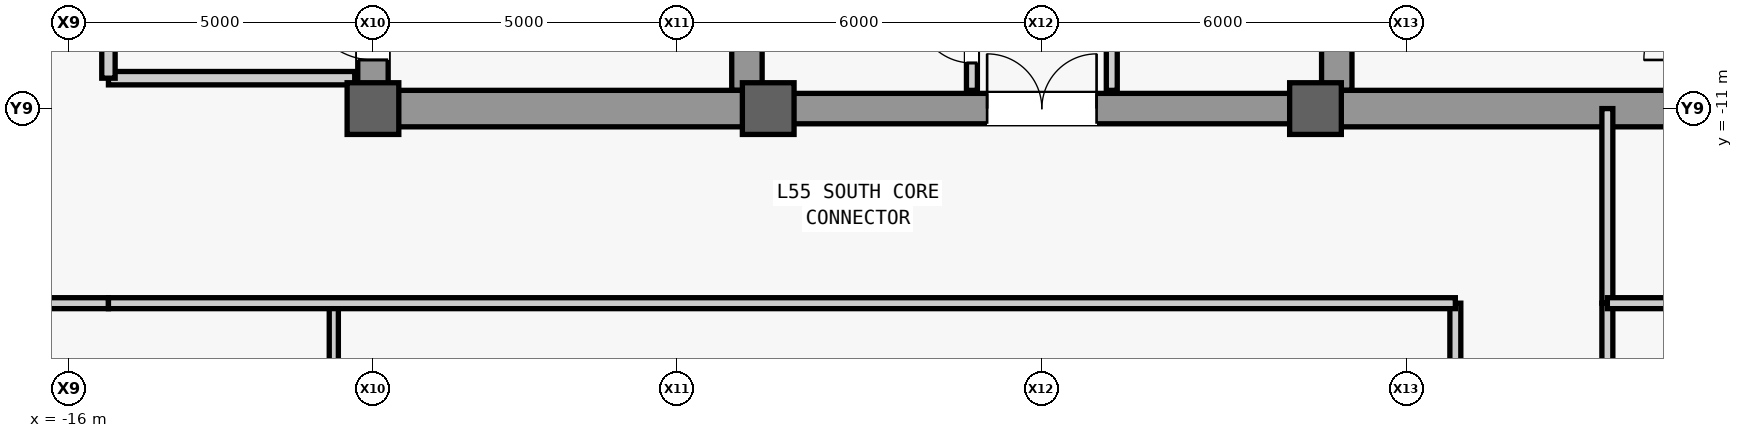
"""IFC4 building model, lengths in metres.
Left out: names, types, materials, properties, quantities, classifications, styles, units other than length and angle.
Written with IfcOpenShell. Run it as: python <this file> out.ifc"""

import sys

from ifc_helpers import new_model, si_unit, direction, frame, frame_2d, origin, origin_2d, place, context, subcontext, project, spatial, rectangle, extrude, source, transform, mapped, element, fill, save


model = new_model("IFC4")
c1 = context("Model", 3, precision=1e-05, world=origin(), true_north=direction((0.0, 1.0)))
c2 = subcontext(c1, "Body", "Model", "MODEL_VIEW")
j1 = project(units=[si_unit("LENGTHUNIT", "METRE"), si_unit("PLANEANGLEUNIT", "RADIAN")], contexts=[c1])
p1 = place(None, origin())
s1 = spatial("IfcSite", under=j1, at=p1, CompositionType="ELEMENT")
p2 = place(p1, origin())
s2 = spatial("IfcBuilding", under=s1, at=p2, CompositionType="ELEMENT")
p3 = place(p2, frame((0.0, 0.0, 235.1)))
s3 = spatial("IfcBuildingStorey", under=s2, at=p3, CompositionType="ELEMENT", Elevation=235.1)
m1 = source(origin(), c2, "Body", "SweptSolid", [
    extrude(rectangle(XDim=22.0, YDim=0.5, at=frame_2d((11.0, 0.0))), origin(), (0.0, 0.0, 1.0), 3.78),
])
p4 = place(p3, frame((-11.0, -11.0, 0.0), z_axis=(0.0, 0.0, 1.0), x_axis=(0.0, 1.0, 0.0)))
e1 = element("IfcWall", 1, at=p4, inside=s3, PredefinedType="SHEAR", context=c2, shape_type="MappedRepresentation", body=[
    mapped(m1, transform((0.0, 0.0, 0.0), scale=1.0)),
])
m2 = source(origin(), c2, "Body", "SweptSolid", [
    extrude(rectangle(XDim=1.1, YDim=2.2, at=frame_2d((0.55, 1.1))), frame((0.0, 0.26, 0.0), z_axis=(0.0, -1.0, 0.0), x_axis=(1.0, 0.0, 0.0)), (0.0, 0.0, 1.0), 0.52),
])
p5 = place(p4, frame((0.8, 0.0, 0.0)))
e2 = element("IfcOpeningElement", 2, at=p5, cuts=e1, PredefinedType="OPENING", context=c2, shape_type="MappedRepresentation", body=[
    mapped(m2, transform((0.0, 0.0, 0.0), scale=1.0)),
])
p6 = place(p4, frame((12.5, 0.0, 0.0)))
e3 = element("IfcOpeningElement", 3, at=p6, cuts=e1, PredefinedType="OPENING", context=c2, shape_type="MappedRepresentation", body=[
    mapped(m2, transform((0.0, 0.0, 0.0), scale=1.0)),
])
m3 = source(origin(), c2, "Body", "SweptSolid", [
    extrude(rectangle(XDim=0.9, YDim=2.15, at=frame_2d((0.45, 1.075))), frame((0.0, 0.26, 0.0), z_axis=(0.0, -1.0, 0.0), x_axis=(1.0, 0.0, 0.0)), (0.0, 0.0, 1.0), 0.52),
])
p7 = place(p4, frame((6.2, 0.0, 0.0)))
e4 = element("IfcOpeningElement", 4, at=p7, cuts=e1, PredefinedType="OPENING", context=c2, shape_type="MappedRepresentation", body=[
    mapped(m3, transform((0.0, 0.0, 0.0), scale=1.0)),
])
p8 = place(p4, frame((8.525, 0.0, 0.0)))
e5 = element("IfcOpeningElement", 5, at=p8, cuts=e1, PredefinedType="OPENING", context=c2, shape_type="MappedRepresentation", body=[
    mapped(m3, transform((0.0, 0.0, 0.0), scale=1.0)),
])
m4 = source(origin(), c2, "Body", "SweptSolid", [
    extrude(rectangle(XDim=1.3, YDim=2.3, at=frame_2d((0.65, 1.15))), frame((0.0, 0.26, 0.0), z_axis=(0.0, -1.0, 0.0), x_axis=(1.0, 0.0, 0.0)), (0.0, 0.0, 1.0), 0.52),
])
p9 = place(p4, frame((2.7, 0.0, 0.0)))
e6 = element("IfcOpeningElement", 6, at=p9, cuts=e1, PredefinedType="OPENING", context=c2, shape_type="MappedRepresentation", body=[
    mapped(m4, transform((0.0, 0.0, 0.0), scale=1.0)),
])
m5 = source(origin(), c2, "Body", "SweptSolid", [
    extrude(rectangle(XDim=21.4, YDim=0.5, at=frame_2d((10.7, 0.0))), origin(), (0.0, 0.0, 1.0), 3.78),
])
for number, where, z_axis, x_axis in (
    (7, (-4.85, -10.7, 0.0), (0.0, 0.0, 1.0), (0.0, 1.0, 0.0)),
    (8, (4.85, -10.7, 0.0), (0.0, 0.0, 1.0), (0.0, 1.0, 0.0)),
):
    element("IfcWall", number, at=place(p3, frame(where, z_axis=z_axis, x_axis=x_axis)), inside=s3, PredefinedType="SHEAR", context=c2, shape_type="MappedRepresentation", body=[
        mapped(m5, transform((0.0, 0.0, 0.0), scale=1.0)),
    ])
m6 = source(origin(), c2, "Body", "SweptSolid", [
    extrude(rectangle(XDim=5.9, YDim=0.6, at=frame_2d((2.95, 0.0))), origin(), (0.0, 0.0, 1.0), 3.78),
])
for number, where, z_axis, x_axis in (
    (9, (-10.75, -11.0, 0.0), (0.0, 0.0, 1.0), (1.0, 0.0, 0.0)),
    (10, (4.85, -11.0, 0.0), (0.0, 0.0, 1.0), (1.0, 0.0, 0.0)),
):
    element("IfcWall", number, at=place(p3, frame(where, z_axis=z_axis, x_axis=x_axis)), inside=s3, PredefinedType="SHEAR", context=c2, shape_type="MappedRepresentation", body=[
        mapped(m6, transform((0.0, 0.0, 0.0), scale=1.0)),
    ])
m7 = source(origin(), c2, "Body", "SweptSolid", [
    extrude(rectangle(XDim=9.2, YDim=0.5, at=frame_2d((4.6, 0.0))), origin(), (0.0, 0.0, 1.0), 3.78),
])
p10 = place(p3, frame((-4.6, -11.0, 0.0), z_axis=(0.0, 0.0, 1.0), x_axis=(1.0, 0.0, 0.0)))
e11 = element("IfcWall", 11, at=p10, inside=s3, PredefinedType="SHEAR", context=c2, shape_type="MappedRepresentation", body=[
    mapped(m7, transform((0.0, 0.0, 0.0), scale=1.0)),
])
m8 = source(origin(), c2, "Body", "SweptSolid", [
    extrude(rectangle(XDim=1.8, YDim=2.25, at=frame_2d((0.9, 1.125))), frame((0.0, 0.26, 0.0), z_axis=(0.0, -1.0, 0.0), x_axis=(1.0, 0.0, 0.0)), (0.0, 0.0, 1.0), 0.52),
])
p11 = place(p10, frame((3.7, 0.0, 0.0)))
e12 = element("IfcOpeningElement", 12, at=p11, cuts=e11, PredefinedType="OPENING", context=c2, shape_type="MappedRepresentation", body=[
    mapped(m8, transform((0.0, 0.0, 0.0), scale=1.0)),
])
m9 = source(origin(), c2, "Body", "SweptSolid", [
    extrude(rectangle(XDim=0.85, YDim=0.85, at=origin_2d()), origin(), (0.0, 0.0, 1.0), 4.0),
])
for number, where, z_axis, x_axis in (
    (13, (-11.0, -11.0, 0.0), (0.0, 0.0, 1.0), (1.0, 0.0, 0.0)),
    (14, (-4.5, -11.0, 0.0), (0.0, 0.0, 1.0), (1.0, 0.0, 0.0)),
    (15, (4.5, -11.0, 0.0), (0.0, 0.0, 1.0), (1.0, 0.0, 0.0)),
):
    element("IfcColumn", number, at=place(p3, frame(where, z_axis=z_axis, x_axis=x_axis)), inside=s3, PredefinedType="COLUMN", context=c2, shape_type="MappedRepresentation", body=[
        mapped(m9, transform((0.0, 0.0, 0.0), scale=1.0)),
    ])
m10 = source(origin(), c2, "Body", "SweptSolid", [
    extrude(rectangle(XDim=4.05, YDim=0.22, at=frame_2d((2.025, 0.0))), origin(), (0.0, 0.0, 1.0), 3.78),
])
p12 = place(p3, frame((-15.35, -10.5, 0.0), z_axis=(0.0, 0.0, 1.0), x_axis=(1.0, 0.0, 0.0)))
e16 = element("IfcWall", 16, at=p12, inside=s3, PredefinedType="PARTITIONING", context=c2, shape_type="MappedRepresentation", body=[
    mapped(m10, transform((0.0, 0.0, 0.0), scale=1.0)),
])
m11 = source(origin(), c2, "Body", "SweptSolid", [
    extrude(rectangle(XDim=4.4, YDim=0.22, at=frame_2d((2.2, 0.0))), origin(), (0.0, 0.0, 1.0), 3.78),
])
p13 = place(p3, frame((-15.35, -10.5, 0.0), z_axis=(0.0, 0.0, 1.0), x_axis=(0.0, 1.0, 0.0)))
e17 = element("IfcWall", 17, at=p13, inside=s3, PredefinedType="PARTITIONING", context=c2, shape_type="MappedRepresentation", body=[
    mapped(m11, transform((0.0, 0.0, 0.0), scale=1.0)),
])
m12 = source(origin(), c2, "Body", "SweptSolid", [
    extrude(rectangle(XDim=1.2, YDim=2.2, at=frame_2d((0.6, 1.1))), frame((0.0, 0.12, 0.0), z_axis=(0.0, -1.0, 0.0), x_axis=(1.0, 0.0, 0.0)), (0.0, 0.0, 1.0), 0.24),
])
p14 = place(p13, frame((1.6, 0.0, 0.0)))
e18 = element("IfcOpeningElement", 18, at=p14, cuts=e17, PredefinedType="OPENING", context=c2, shape_type="MappedRepresentation", body=[
    mapped(m12, transform((0.0, 0.0, 0.0), scale=1.0)),
])
m13 = source(origin(), c2, "Body", "SweptSolid", [
    extrude(rectangle(XDim=5.4, YDim=0.18, at=frame_2d((2.7, 0.0))), origin(), (0.0, 0.0, 1.0), 3.78),
])
p15 = place(p3, frame((-1.15, -10.7, 0.0), z_axis=(0.0, 0.0, 1.0), x_axis=(0.0, 1.0, 0.0)))
e19 = element("IfcWall", 19, at=p15, inside=s3, PredefinedType="PARTITIONING", context=c2, shape_type="MappedRepresentation", body=[
    mapped(m13, transform((0.0, 0.0, 0.0), scale=1.0)),
])
m14 = source(origin(), c2, "Body", "SweptSolid", [
    extrude(rectangle(XDim=0.9, YDim=2.15, at=frame_2d((0.45, 1.075))), frame((0.0, 0.1, 0.0), z_axis=(0.0, -1.0, 0.0), x_axis=(1.0, 0.0, 0.0)), (0.0, 0.0, 1.0), 0.2),
])
p16 = place(p15, frame((0.45, 0.0, 0.0)))
e20 = element("IfcOpeningElement", 20, at=p16, cuts=e19, PredefinedType="OPENING", context=c2, shape_type="MappedRepresentation", body=[
    mapped(m14, transform((0.0, 0.0, 0.0), scale=1.0)),
])
p17 = place(p15, frame((2.25, 0.0, 0.0)))
e21 = element("IfcOpeningElement", 21, at=p17, cuts=e19, PredefinedType="OPENING", context=c2, shape_type="MappedRepresentation", body=[
    mapped(m14, transform((0.0, 0.0, 0.0), scale=1.0)),
])
p18 = place(p15, frame((4.05, 0.0, 0.0)))
e22 = element("IfcOpeningElement", 22, at=p18, cuts=e19, PredefinedType="OPENING", context=c2, shape_type="MappedRepresentation", body=[
    mapped(m14, transform((0.0, 0.0, 0.0), scale=1.0)),
])
p19 = place(p3, frame((1.15, -10.7, 0.0), z_axis=(0.0, 0.0, 1.0), x_axis=(0.0, 1.0, 0.0)))
e23 = element("IfcWall", 23, at=p19, inside=s3, PredefinedType="PARTITIONING", context=c2, shape_type="MappedRepresentation", body=[
    mapped(m13, transform((0.0, 0.0, 0.0), scale=1.0)),
])
p20 = place(p19, frame((0.95, 0.0, 0.0)))
e24 = element("IfcOpeningElement", 24, at=p20, cuts=e23, PredefinedType="OPENING", context=c2, shape_type="MappedRepresentation", body=[
    mapped(m14, transform((0.0, 0.0, 0.0), scale=1.0)),
])
p21 = place(p19, frame((3.65, 0.0, 0.0)))
e25 = element("IfcOpeningElement", 25, at=p21, cuts=e23, PredefinedType="OPENING", context=c2, shape_type="MappedRepresentation", body=[
    mapped(m14, transform((0.0, 0.0, 0.0), scale=1.0)),
])
m15 = source(origin(), c2, "Body", "SweptSolid", [
    extrude(rectangle(XDim=2.45, YDim=0.18, at=frame_2d((1.225, 0.0))), origin(), (0.0, 0.0, 1.0), 3.78),
])
p22 = place(p3, frame((-17.8, -14.2, 0.0), z_axis=(0.0, 0.0, 1.0), x_axis=(1.0, 0.0, 0.0)))
e26 = element("IfcWall", 26, at=p22, inside=s3, PredefinedType="PARTITIONING", context=c2, shape_type="MappedRepresentation", body=[
    mapped(m15, transform((0.0, 0.0, 0.0), scale=1.0)),
])
m16 = source(origin(), c2, "Body", "SweptSolid", [
    extrude(rectangle(XDim=3.2, YDim=0.18, at=frame_2d((1.6, 0.0))), origin(), (0.0, 0.0, 1.0), 3.78),
])
p23 = place(p3, frame((9.3, -14.2, 0.0), z_axis=(0.0, 0.0, 1.0), x_axis=(0.0, 1.0, 0.0)))
e27 = element("IfcWall", 27, at=p23, inside=s3, PredefinedType="PARTITIONING", context=c2, shape_type="MappedRepresentation", body=[
    mapped(m16, transform((0.0, 0.0, 0.0), scale=1.0)),
])
m17 = source(origin(), c2, "Body", "SweptSolid", [
    extrude(rectangle(XDim=15.8, YDim=0.15, at=frame_2d((7.9, 0.0))), origin(), (0.0, 0.0, 1.0), 3.78),
])
p24 = place(p3, frame((-11.644, -30.0, 0.0), z_axis=(0.0, 0.0, 1.0), x_axis=(0.0, 1.0, 0.0)))
e28 = element("IfcWall", 28, at=p24, inside=s3, PredefinedType="PARTITIONING", context=c2, shape_type="MappedRepresentation", body=[
    mapped(m17, transform((0.0, 0.0, 0.0), scale=1.0)),
])
m18 = source(origin(), c2, "Body", "SweptSolid", [
    extrude(rectangle(XDim=0.95, YDim=2.15, at=frame_2d((0.475, 1.075))), frame((0.0, 0.085, 0.0), z_axis=(0.0, -1.0, 0.0), x_axis=(1.0, 0.0, 0.0)), (0.0, 0.0, 1.0), 0.17),
])
p25 = place(p24, frame((11.375, 0.0, 0.0)))
e29 = element("IfcOpeningElement", 29, at=p25, cuts=e28, PredefinedType="OPENING", context=c2, shape_type="MappedRepresentation", body=[
    mapped(m18, transform((0.0, 0.0, 0.0), scale=1.0)),
])
m19 = source(origin(), c2, "Body", "SweptSolid", [
    extrude(rectangle(XDim=15.8, YDim=0.18, at=frame_2d((7.9, 0.0))), origin(), (0.0, 0.0, 1.0), 3.78),
])
p26 = place(p3, frame((6.8, -30.0, 0.0), z_axis=(0.0, 0.0, 1.0), x_axis=(0.0, 1.0, 0.0)))
e30 = element("IfcWall", 30, at=p26, inside=s3, PredefinedType="PARTITIONING", context=c2, shape_type="MappedRepresentation", body=[
    mapped(m19, transform((0.0, 0.0, 0.0), scale=1.0)),
])
m20 = source(origin(), c2, "Body", "SweptSolid", [
    extrude(rectangle(XDim=1.05, YDim=2.2, at=frame_2d((0.525, 1.1))), frame((0.0, 0.1, 0.0), z_axis=(0.0, -1.0, 0.0), x_axis=(1.0, 0.0, 0.0)), (0.0, 0.0, 1.0), 0.2),
])
p27 = place(p26, frame((3.425, 0.0, 0.0)))
e31 = element("IfcOpeningElement", 31, at=p27, cuts=e30, PredefinedType="OPENING", context=c2, shape_type="MappedRepresentation", body=[
    mapped(m20, transform((0.0, 0.0, 0.0), scale=1.0)),
])
m21 = source(origin(), c2, "Body", "SweptSolid", [
    extrude(rectangle(XDim=22.15, YDim=0.18, at=frame_2d((11.075, 0.0))), origin(), (0.0, 0.0, 1.0), 3.78),
])
p28 = place(p3, frame((-15.35, -14.2, 0.0), z_axis=(0.0, 0.0, 1.0), x_axis=(1.0, 0.0, 0.0)))
e32 = element("IfcWall", 32, at=p28, inside=s3, PredefinedType="PARTITIONING", context=c2, shape_type="MappedRepresentation", body=[
    mapped(m21, transform((0.0, 0.0, 0.0), scale=1.0)),
])
p29 = place(p3, frame((9.3, -30.0, 0.0), z_axis=(0.0, 0.0, 1.0), x_axis=(0.0, 1.0, 0.0)))
e33 = element("IfcWall", 33, at=p29, inside=s3, PredefinedType="PARTITIONING", context=c2, shape_type="MappedRepresentation", body=[
    mapped(m19, transform((0.0, 0.0, 0.0), scale=1.0)),
])
p30 = place(p29, frame((3.425, 0.0, 0.0)))
e34 = element("IfcOpeningElement", 34, at=p30, cuts=e33, PredefinedType="OPENING", context=c2, shape_type="MappedRepresentation", body=[
    mapped(m20, transform((0.0, 0.0, 0.0), scale=1.0)),
])
m22 = source(origin(), c2, "Body", "SweptSolid", [
    extrude(rectangle(XDim=6.05, YDim=0.18, at=frame_2d((3.025, 0.0))), origin(), (0.0, 0.0, 1.0), 3.78),
])
p31 = place(p3, frame((9.3, -14.2, 0.0), z_axis=(0.0, 0.0, 1.0), x_axis=(1.0, 0.0, 0.0)))
e35 = element("IfcWall", 35, at=p31, inside=s3, PredefinedType="PARTITIONING", context=c2, shape_type="MappedRepresentation", body=[
    mapped(m22, transform((0.0, 0.0, 0.0), scale=1.0)),
])
m23 = source(origin(), c2, "Body", "SweptSolid", [
    extrude(rectangle(XDim=1.1, YDim=2.2, at=frame_2d((0.55, 1.1))), frame((0.0, 0.025, 0.0), z_axis=(0.0, -1.0, 0.0), x_axis=(1.0, 0.0, 0.0)), (0.0, 0.0, 1.0), 0.05),
])
p32 = place(p5, origin())
e36 = element("IfcDoor", 36, at=p32, inside=s3, OperationType="SINGLE_SWING_RIGHT", PredefinedType="DOOR", context=c2, shape_type="MappedRepresentation", body=[
    mapped(m23, transform((0.0, 0.0, 0.0), scale=1.0)),
])
fill(e2, e36)
m24 = source(origin(), c2, "Body", "SweptSolid", [
    extrude(rectangle(XDim=0.9, YDim=2.15, at=frame_2d((0.45, 1.075))), frame((0.0, 0.025, 0.0), z_axis=(0.0, -1.0, 0.0), x_axis=(1.0, 0.0, 0.0)), (0.0, 0.0, 1.0), 0.05),
])
p33 = place(p16, origin())
e37 = element("IfcDoor", 37, at=p33, inside=s3, OperationType="SINGLE_SWING_RIGHT", PredefinedType="DOOR", context=c2, shape_type="MappedRepresentation", body=[
    mapped(m24, transform((0.0, 0.0, 0.0), scale=1.0)),
])
fill(e20, e37)
m25 = source(origin(), c2, "Body", "SweptSolid", [
    extrude(rectangle(XDim=1.8, YDim=2.25, at=frame_2d((0.9, 1.125))), frame((0.0, 0.025, 0.0), z_axis=(0.0, -1.0, 0.0), x_axis=(1.0, 0.0, 0.0)), (0.0, 0.0, 1.0), 0.05),
])
p34 = place(p11, origin())
e38 = element("IfcDoor", 38, at=p34, inside=s3, OperationType="SINGLE_SWING_LEFT", PredefinedType="DOOR", context=c2, shape_type="MappedRepresentation", body=[
    mapped(m25, transform((0.0, 0.0, 0.0), scale=1.0)),
])
fill(e12, e38)
save(model, sys.argv[1])
